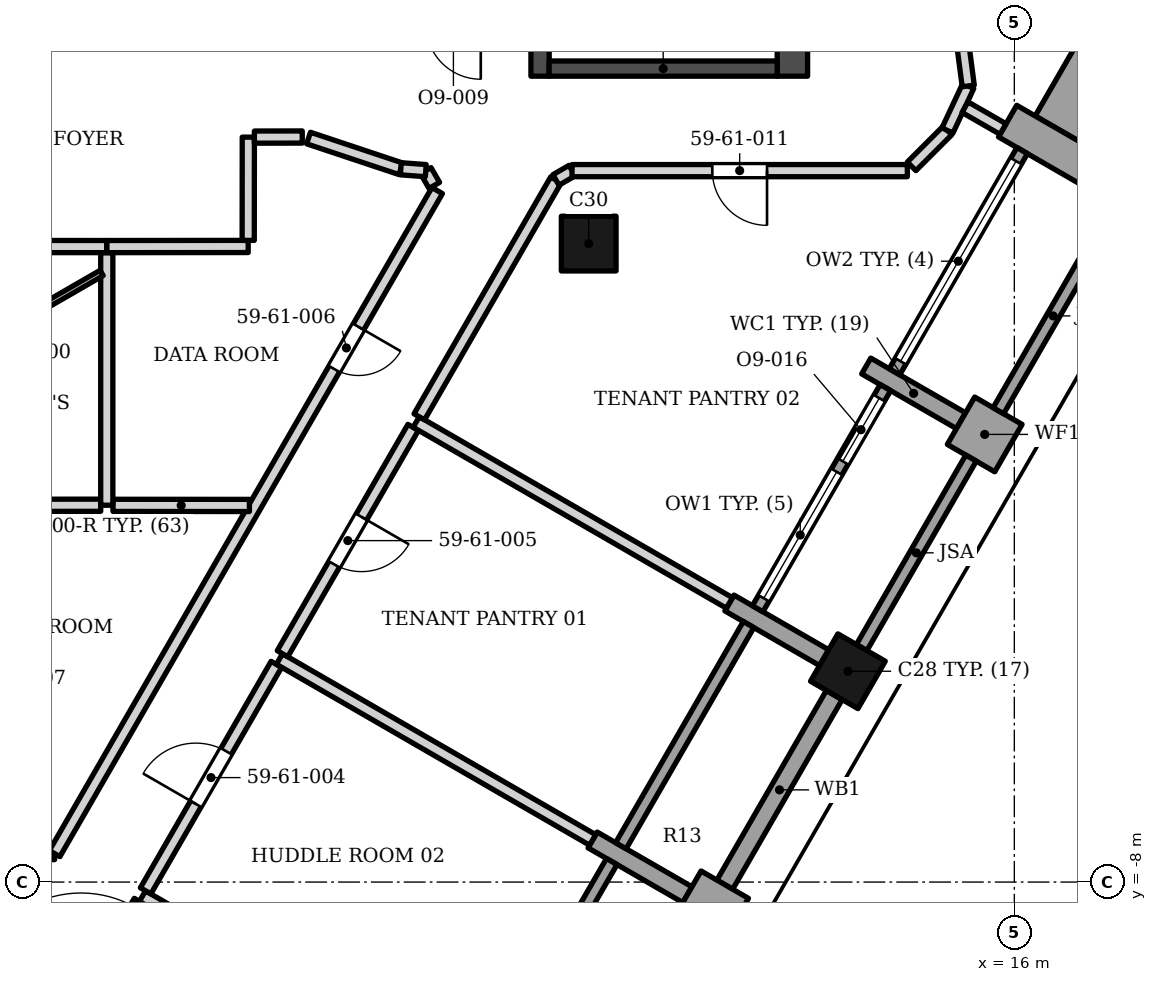
"""IFC4 building model, lengths in metres.
Left out: names, types, materials, properties, quantities, classifications, styles, units other than length and angle.
Written with IfcOpenShell. Run it as: python <this file> out.ifc"""

import sys

from ifc_helpers import new_model, si_unit, direction, frame, frame_2d, origin, origin_2d, place, context, subcontext, project, spatial, polyline, rectangle, outline, extrude, element, fill, save


model = new_model("IFC4")
c1 = context("Model", 3, precision=1e-05, world=origin(), true_north=direction((0.0, 1.0)))
c2 = subcontext(c1, "Body", "Model", "MODEL_VIEW")
j1 = project(units=[si_unit("LENGTHUNIT", "METRE"), si_unit("PLANEANGLEUNIT", "RADIAN")], contexts=[c1])
p1 = place(None, origin())
s1 = spatial("IfcSite", under=j1, at=p1, CompositionType="ELEMENT")
p2 = place(p1, origin())
s2 = spatial("IfcBuilding", under=s1, at=p2, CompositionType="ELEMENT")
p3 = place(p2, frame((0.0, 0.0, 248.2)))
s3 = spatial("IfcBuildingStorey", under=s2, at=p3, CompositionType="ELEMENT", Elevation=248.2)
p4 = place(p3, frame((12.35, 5.253, 0.0), z_axis=(0.0, 0.0, 1.0), x_axis=(0.0, 1.0, 0.0)))
e1 = element("IfcWall", 1, at=p4, inside=s3, PredefinedType="SHEAR", context=c2, shape_type="SweptSolid", body=[
    extrude(rectangle(XDim=13.8, YDim=0.5, at=frame_2d((6.9, 0.0))), origin(), (0.0, 0.0, 1.0), 3.9),
])
p5 = place(p3, frame((8.2, 5.253, 0.0), z_axis=(0.0, 0.0, 1.0), x_axis=(0.0, 1.0, 0.0)))
e2 = element("IfcWall", 2, at=p5, inside=s3, PredefinedType="SHEAR", context=c2, shape_type="SweptSolid", body=[
    extrude(rectangle(XDim=13.3, YDim=0.3, at=frame_2d((6.65, 0.0))), origin(), (0.0, 0.0, 1.0), 3.9),
])
p6 = place(p5, frame((7.1, 0.0, 0.0)))
e3 = element("IfcOpeningElement", 3, at=p6, cuts=e2, PredefinedType="OPENING", context=c2, shape_type="SweptSolid", body=[
    extrude(rectangle(XDim=1.4, YDim=2.1, at=frame_2d((0.7, 1.05))), frame((0.0, 0.16, 0.0), z_axis=(0.0, -1.0, 0.0), x_axis=(1.0, 0.0, 0.0)), (0.0, 0.0, 1.0), 0.32),
])
p7 = place(p5, frame((5.05, 0.0, 0.0)))
e4 = element("IfcOpeningElement", 4, at=p7, cuts=e2, PredefinedType="OPENING", context=c2, shape_type="SweptSolid", body=[
    extrude(rectangle(XDim=1.4, YDim=2.1, at=frame_2d((0.7, 1.05))), frame((0.0, 0.16, 0.0), z_axis=(0.0, -1.0, 0.0), x_axis=(1.0, 0.0, 0.0)), (0.0, 0.0, 1.0), 0.32),
])
p8 = place(p3, frame((8.35, 5.378, 0.0), z_axis=(0.0, 0.0, 1.0), x_axis=(1.0, 0.0, 0.0)))
e5 = element("IfcWall", 5, at=p8, inside=s3, PredefinedType="SHEAR", context=c2, shape_type="SweptSolid", body=[
    extrude(rectangle(XDim=3.75, YDim=0.25, at=frame_2d((1.875, 0.0))), origin(), (0.0, 0.0, 1.0), 3.9),
])
for number, where, z_axis, x_axis in (
    (6, (9.0, 2.5, 0.0), (0.0, 0.0, 1.0), (1.0, 0.0, 0.0)),
    (7, (13.263, -4.533, 0.0), (0.0, 0.0, 1.0), (0.5, 0.866, 0.0)),
):
    element("IfcColumn", number, at=place(p3, frame(where, z_axis=z_axis, x_axis=x_axis)), inside=s3, PredefinedType="COLUMN", context=c2, shape_type="SweptSolid", body=[
        extrude(rectangle(XDim=0.9, YDim=0.9, at=origin_2d()), origin(), (0.0, 0.0, 1.0), 3.9),
    ])
p9 = place(p3, frame((10.788, -8.822, 0.0), z_axis=(0.0, 0.0, 1.0), x_axis=(0.50001992892, 0.866013897511, 0.0)))
e8 = element("IfcWall", 8, at=p9, inside=s3, PredefinedType="SOLIDWALL", context=c2, shape_type="SweptSolid", body=[
    extrude(rectangle(XDim=0.9, YDim=0.9, at=frame_2d((0.45, 0.0))), origin(), (0.0, 0.0, 1.0), 3.0),
])
p10 = place(p3, frame((9.064, -7.307, 0.0), z_axis=(0.0, 0.0, 1.0), x_axis=(0.865989075817, -0.500062916607, 0.0)))
e9 = element("IfcWall", 9, at=p10, inside=s3, PredefinedType="SOLIDWALL", context=c2, shape_type="SweptSolid", body=[
    extrude(rectangle(XDim=1.8, YDim=0.3, at=frame_2d((0.9, 0.0))), origin(), (0.0, 0.0, 1.0), 3.0),
])
p11 = place(p3, frame((11.314, -3.41, 0.0), z_axis=(0.0, 0.0, 1.0), x_axis=(0.866029639064, -0.499992664208, 0.0)))
e10 = element("IfcWall", 10, at=p11, inside=s3, PredefinedType="SOLIDWALL", context=c2, shape_type="SweptSolid", body=[
    extrude(rectangle(XDim=1.799, YDim=0.3, at=frame_2d((0.899, 0.0))), origin(), (0.0, 0.0, 1.0), 3.0),
])
p12 = place(p3, frame((15.123, -0.413, 0.0), z_axis=(0.0, 0.0, 1.0), x_axis=(0.865964261186, -0.500105887137, 0.0)))
e11 = element("IfcWall", 11, at=p12, inside=s3, PredefinedType="SOLIDWALL", context=c2, shape_type="SweptSolid", body=[
    extrude(rectangle(XDim=0.9, YDim=0.9, at=frame_2d((0.45, 0.0))), origin(), (0.0, 0.0, 1.0), 3.0),
])
p13 = place(p3, frame((15.123, -0.413, 0.0), z_axis=(0.0, 0.0, 1.0), x_axis=(-0.866047807691, 0.499961193289, 0.0)))
e12 = element("IfcWall", 12, at=p13, inside=s3, PredefinedType="SOLIDWALL", context=c2, shape_type="SweptSolid", body=[
    extrude(rectangle(XDim=1.8, YDim=0.3, at=frame_2d((0.9, 0.0))), origin(), (0.0, 0.0, 1.0), 3.0),
])
p14 = place(p3, frame((17.448, 3.614, 0.0), z_axis=(0.0, 0.0, 1.0), x_axis=(-0.865989075817, 0.500062916607, 0.0)))
e13 = element("IfcWall", 13, at=p14, inside=s3, PredefinedType="SOLIDWALL", context=c2, shape_type="SweptSolid", body=[
    extrude(rectangle(XDim=1.8, YDim=0.6, at=frame_2d((0.9, 0.0))), origin(), (0.0, 0.0, 1.0), 2.95),
])
p15 = place(p3, frame((7.279, -11.3, 0.0), z_axis=(0.0, 0.0, 1.0), x_axis=(0.500027713859, 0.866009402589, 0.0)))
e14 = element("IfcWall", 14, at=p15, inside=s3, PredefinedType="ELEMENTEDWALL", context=c2, shape_type="SweptSolid", body=[
    extrude(rectangle(XDim=4.2, YDim=0.2, at=frame_2d((2.1, 0.0))), origin(), (0.0, 0.0, 1.0), 3.0),
])
p16 = place(p3, frame((11.238, -8.043, 0.0), z_axis=(0.0, 0.0, 1.0), x_axis=(0.500012057535, 0.866018442252, 0.0)))
e15 = element("IfcWall", 15, at=p16, inside=s3, PredefinedType="SOLIDWALL", context=c2, shape_type="SweptSolid", body=[
    extrude(rectangle(XDim=3.6, YDim=0.3, at=frame_2d((1.8, 0.0))), origin(), (0.0, 0.0, 1.0), 3.0),
])
p17 = place(p3, frame((9.529, -7.403, 0.0), z_axis=(0.0, 0.0, 1.0), x_axis=(0.500002543286, 0.866023935413, 0.0)))
e16 = element("IfcWall", 16, at=p17, inside=s3, PredefinedType="ELEMENTEDWALL", context=c2, shape_type="SweptSolid", body=[
    extrude(rectangle(XDim=4.2, YDim=0.2, at=frame_2d((2.1, 0.0))), origin(), (0.0, 0.0, 1.0), 3.0),
])
p18 = place(p3, origin())
e17 = element("IfcWall", 17, at=p18, inside=s3, PredefinedType="SOLIDWALL", context=c2, shape_type="SweptSolid", body=[
    extrude(outline(polyline([(15.201, -0.978), (13.402, -4.094), (13.576, -4.194), (15.375, -1.078), (15.201, -0.978)])), origin(), (0.0, 0.0, 1.0), 3.0),
])
p19 = place(p3, frame((11.779, -3.505, 0.0), z_axis=(0.0, 0.0, 1.0), x_axis=(0.500027713859, 0.866009402589, 0.0)))
e18 = element("IfcWall", 18, at=p19, inside=s3, PredefinedType="ELEMENTEDWALL", context=c2, shape_type="SweptSolid", body=[
    extrude(rectangle(XDim=4.2, YDim=0.2, at=frame_2d((2.1, 0.0))), origin(), (0.0, 0.0, 1.0), 3.0),
])
p20 = place(p19, frame((0.2, 0.0, 0.45)))
e19 = element("IfcOpeningElement", 19, at=p20, cuts=e18, PredefinedType="OPENING", context=c2, shape_type="SweptSolid", body=[
    extrude(rectangle(XDim=2.4, YDim=2.25, at=frame_2d((1.2, 1.125))), frame((0.0, 0.11, 0.0), z_axis=(0.0, -1.0, 0.0), x_axis=(1.0, 0.0, 0.0)), (0.0, 0.0, 1.0), 0.22),
])
p21 = place(p19, frame((2.8, 0.0, 0.0)))
e20 = element("IfcOpeningElement", 20, at=p21, cuts=e18, PredefinedType="OPENING", context=c2, shape_type="SweptSolid", body=[
    extrude(rectangle(XDim=1.2, YDim=2.7, at=frame_2d((0.6, 1.35))), frame((0.0, 0.11, 0.0), z_axis=(0.0, -1.0, 0.0), x_axis=(1.0, 0.0, 0.0)), (0.0, 0.0, 1.0), 0.22),
])
p22 = place(p3, frame((15.738, -0.249, 0.0), z_axis=(0.0, 0.0, 1.0), x_axis=(0.500012057535, 0.866018442252, 0.0)))
e21 = element("IfcWall", 21, at=p22, inside=s3, PredefinedType="SOLIDWALL", context=c2, shape_type="SweptSolid", body=[
    extrude(rectangle(XDim=3.6, YDim=0.2, at=frame_2d((1.8, 0.0))), origin(), (0.0, 0.0, 1.0), 3.0),
])
p23 = place(p3, frame((14.029, 0.392, 0.0), z_axis=(0.0, 0.0, 1.0), x_axis=(0.500027713859, 0.866009402589, 0.0)))
e22 = element("IfcWall", 22, at=p23, inside=s3, PredefinedType="ELEMENTEDWALL", context=c2, shape_type="SweptSolid", body=[
    extrude(rectangle(XDim=4.2, YDim=0.2, at=frame_2d((2.1, 0.0))), origin(), (0.0, 0.0, 1.0), 2.95),
])
p24 = place(p23, frame((0.2, 0.0, 0.45)))
e23 = element("IfcOpeningElement", 23, at=p24, cuts=e22, PredefinedType="OPENING", context=c2, shape_type="SweptSolid", body=[
    extrude(rectangle(XDim=3.8, YDim=2.25, at=frame_2d((1.9, 1.125))), frame((0.0, 0.11, 0.0), z_axis=(0.0, -1.0, 0.0), x_axis=(1.0, 0.0, 0.0)), (0.0, 0.0, 1.0), 0.22),
])
p25 = place(p3, origin())
e24 = element("IfcWall", 24, at=p25, inside=s3, PredefinedType="SOLIDWALL", context=c2, shape_type="SweptSolid", body=[
    extrude(outline(polyline([(18.378, 3.424), (18.378, 3.424), (18.378, 3.424), (20.271, 6.703), (18.236, 7.878), (16.343, 4.599), (17.598, 3.874), (17.598, 3.874), (18.378, 3.424)])), origin(), (0.0, 0.0, 1.0), 2.974),
])
p26 = place(p3, frame((0.598, -10.073, 0.0), z_axis=(0.0, 0.0, 1.0), x_axis=(0.500670744682, 0.865637802675, 0.0)))
e25 = element("IfcWall", 25, at=p26, inside=s3, PredefinedType="PARTITIONING", context=c2, shape_type="SweptSolid", body=[
    extrude(rectangle(XDim=2.028, YDim=0.2, at=frame_2d((1.014, 0.0))), origin(), (0.0, 0.0, 1.0), 3.73),
])
p27 = place(p26, frame((0.107, 0.0, 0.0)))
e26 = element("IfcOpeningElement", 26, at=p27, cuts=e25, PredefinedType="OPENING", context=c2, shape_type="SweptSolid", body=[
    extrude(rectangle(XDim=1.8, YDim=2.4, at=frame_2d((0.9, 1.2))), frame((0.0, 0.11, 0.0), z_axis=(0.0, -1.0, 0.0), x_axis=(1.0, 0.0, 0.0)), (0.0, 0.0, 1.0), 0.22),
])
p28 = place(p3, frame((1.661, -8.231, 0.0), z_axis=(0.0, 0.0, 1.0), x_axis=(0.866162357873, -0.499762713499, 0.0)))
e27 = element("IfcWall", 27, at=p28, inside=s3, PredefinedType="PARTITIONING", context=c2, shape_type="SweptSolid", body=[
    extrude(rectangle(XDim=5.95, YDim=0.2, at=frame_2d((2.975, 0.0))), origin(), (0.0, 0.0, 1.0), 2.884),
])
p29 = place(p3, frame((-0.161, -7.53, 0.0), z_axis=(0.0, 0.0, 1.0), x_axis=(0.999986611797, -0.005174574964, 0.0)))
e28 = element("IfcWall", 28, at=p29, inside=s3, PredefinedType="PARTITIONING", context=c2, shape_type="SweptSolid", body=[
    extrude(rectangle(XDim=0.377, YDim=0.2, at=frame_2d((0.189, 0.0))), origin(), (0.0, 0.0, 1.0), 3.73),
])
p30 = place(p3, frame((0.217, -7.532, 0.0), z_axis=(0.0, 0.0, 1.0), x_axis=(0.499766665369, 0.866160077691, 0.0)))
e29 = element("IfcWall", 29, at=p30, inside=s3, PredefinedType="PARTITIONING", context=c2, shape_type="SweptSolid", body=[
    extrude(rectangle(XDim=12.588, YDim=0.2, at=frame_2d((6.294, 0.0))), origin(), (0.0, 0.0, 1.0), 2.884),
])
p31 = place(p30, frame((9.201, 0.0, 0.0)))
e30 = element("IfcOpeningElement", 30, at=p31, cuts=e29, PredefinedType="OPENING", context=c2, shape_type="SweptSolid", body=[
    extrude(rectangle(XDim=0.8, YDim=2.1, at=frame_2d((0.4, 1.05))), frame((0.0, 0.11, 0.0), z_axis=(0.0, -1.0, 0.0), x_axis=(1.0, 0.0, 0.0)), (0.0, 0.0, 1.0), 0.22),
])
p32 = place(p3, frame((1.713, -8.144, 0.0), z_axis=(0.0, 0.0, 1.0), x_axis=(0.499986217557, 0.866033360935, 0.0)))
e31 = element("IfcWall", 31, at=p32, inside=s3, PredefinedType="PARTITIONING", context=c2, shape_type="SweptSolid", body=[
    extrude(rectangle(XDim=4.3, YDim=0.2, at=frame_2d((2.15, 0.0))), origin(), (0.0, 0.0, 1.0), 3.73),
])
p33 = place(p32, frame((1.65, 0.0, 0.0)))
e32 = element("IfcOpeningElement", 32, at=p33, cuts=e31, PredefinedType="OPENING", context=c2, shape_type="SweptSolid", body=[
    extrude(rectangle(XDim=1.0, YDim=2.1, at=frame_2d((0.5, 1.05))), frame((0.0, 0.11, 0.0), z_axis=(0.0, -1.0, 0.0), x_axis=(1.0, 0.0, 0.0)), (0.0, 0.0, 1.0), 0.22),
])
p34 = place(p3, frame((3.914, -4.332, 0.0), z_axis=(0.0, 0.0, 1.0), x_axis=(0.865897075154, -0.500222205864, 0.0)))
e33 = element("IfcWall", 33, at=p34, inside=s3, PredefinedType="PARTITIONING", context=c2, shape_type="SweptSolid", body=[
    extrude(rectangle(XDim=5.948, YDim=0.2, at=frame_2d((2.974, 0.0))), origin(), (0.0, 0.0, 1.0), 2.884),
])
p35 = place(p3, frame((1.176, -1.805, 0.0), z_axis=(0.0, 0.0, 1.0), x_axis=(0.999999709909, -0.000761697276, 0.0)))
e34 = element("IfcWall", 34, at=p35, inside=s3, PredefinedType="PARTITIONING", context=c2, shape_type="SweptSolid", body=[
    extrude(rectangle(XDim=2.244, YDim=0.2, at=frame_2d((1.122, 0.0))), origin(), (0.0, 0.0, 1.0), 3.73),
])
p36 = place(p3, frame((-1.227, -1.805, 0.0), z_axis=(0.0, 0.0, 1.0), x_axis=(0.999999698604, 0.000776397282, 0.0)))
e35 = element("IfcWall", 35, at=p36, inside=s3, PredefinedType="PARTITIONING", context=c2, shape_type="SweptSolid", body=[
    extrude(rectangle(XDim=2.201, YDim=0.2, at=frame_2d((1.101, 0.0))), origin(), (0.0, 0.0, 1.0), 3.73),
])
p37 = place(p3, frame((1.074, -1.803, 0.0), z_axis=(0.0, 0.0, 1.0), x_axis=(0.0, 1.0, 0.0)))
e36 = element("IfcWall", 36, at=p37, inside=s3, PredefinedType="PARTITIONING", context=c2, shape_type="SweptSolid", body=[
    extrude(rectangle(XDim=4.154, YDim=0.2, at=frame_2d((2.077, 0.0))), origin(), (0.0, 0.0, 1.0), 3.73),
])
p38 = place(p3, frame((3.964, -4.245, 0.0), z_axis=(0.0, 0.0, 1.0), x_axis=(0.499987977232, 0.866032345022, 0.0)))
e37 = element("IfcWall", 37, at=p38, inside=s3, PredefinedType="PARTITIONING", context=c2, shape_type="SweptSolid", body=[
    extrude(rectangle(XDim=4.298, YDim=0.2, at=frame_2d((2.149, 0.0))), origin(), (0.0, 0.0, 1.0), 2.884),
])
p39 = place(p38, frame((1.698, 0.0, 0.0)))
e38 = element("IfcOpeningElement", 38, at=p39, cuts=e37, PredefinedType="OPENING", context=c2, shape_type="SweptSolid", body=[
    extrude(rectangle(XDim=0.9, YDim=2.1, at=frame_2d((0.45, 1.05))), frame((0.0, 0.11, 0.0), z_axis=(0.0, -1.0, 0.0), x_axis=(1.0, 0.0, 0.0)), (0.0, 0.0, 1.0), 0.22),
])
p40 = place(p3, frame((6.163, -0.434, 0.0), z_axis=(0.0, 0.0, 1.0), x_axis=(0.865895092647, -0.500225637618, 0.0)))
e39 = element("IfcWall", 39, at=p40, inside=s3, PredefinedType="PARTITIONING", context=c2, shape_type="SweptSolid", body=[
    extrude(rectangle(XDim=5.949, YDim=0.2, at=frame_2d((2.975, 0.0))), origin(), (0.0, 0.0, 1.0), 3.052),
])
p41 = place(p3, frame((-2.32, 0.106, 0.0), z_axis=(0.0, 0.0, 1.0), x_axis=(0.866013238859, 0.500021069677, 0.0)))
e40 = element("IfcWall", 40, at=p41, inside=s3, PredefinedType="PARTITIONING", context=c2, shape_type="SweptSolid", body=[
    extrude(rectangle(XDim=3.822, YDim=0.1, at=frame_2d((1.911, 0.0))), origin(), (0.0, 0.0, 1.0), 2.884),
])
p42 = place(p3, frame((-3.4, 2.452, 0.0), z_axis=(0.0, 0.0, 1.0), x_axis=(0.999999927065, -0.000381929261, 0.0)))
e41 = element("IfcWall", 41, at=p42, inside=s3, PredefinedType="PARTITIONING", context=c2, shape_type="SweptSolid", body=[
    extrude(rectangle(XDim=4.475, YDim=0.2, at=frame_2d((2.237, 0.0))), origin(), (0.0, 0.0, 1.0), 3.73),
])
p43 = place(p3, frame((1.076, 2.451, 0.0), z_axis=(0.0, 0.0, 1.0), x_axis=(0.999999729558, 0.000735448425, 0.0)))
e42 = element("IfcWall", 42, at=p43, inside=s3, PredefinedType="PARTITIONING", context=c2, shape_type="SweptSolid", body=[
    extrude(rectangle(XDim=2.324, YDim=0.2, at=frame_2d((1.162, 0.0))), origin(), (0.0, 0.0, 1.0), 3.73),
])
p44 = place(p3, frame((6.32, 3.7, 0.0), z_axis=(0.0, 0.0, 1.0), x_axis=(0.499973348067, -0.866040790738, 0.0)))
e43 = element("IfcWall", 43, at=p44, inside=s3, PredefinedType="PARTITIONING", context=c2, shape_type="SweptSolid", body=[
    extrude(rectangle(XDim=0.281, YDim=0.2, at=frame_2d((0.14, 0.0))), origin(), (0.0, 0.0, 1.0), 3.73),
])
p45 = place(p3, frame((6.214, -0.349, 0.0), z_axis=(0.0, 0.0, 1.0), x_axis=(0.499747517155, 0.866171125758, 0.0)))
e44 = element("IfcWall", 44, at=p45, inside=s3, PredefinedType="PARTITIONING", context=c2, shape_type="SweptSolid", body=[
    extrude(rectangle(XDim=4.497, YDim=0.2, at=frame_2d((2.249, 0.0))), origin(), (0.0, 0.0, 1.0), 3.73),
])
p46 = place(p3, frame((8.461, 3.546, 0.0), z_axis=(0.0, 0.0, 1.0), x_axis=(0.865826662844, 0.500344071524, 0.0)))
e45 = element("IfcWall", 45, at=p46, inside=s3, PredefinedType="PARTITIONING", context=c2, shape_type="SweptSolid", body=[
    extrude(rectangle(XDim=0.306, YDim=0.2, at=frame_2d((0.153, 0.0))), origin(), (0.0, 0.0, 1.0), 3.73),
])
p47 = place(p3, frame((8.726, 3.699, 0.0), z_axis=(0.0, 0.0, 1.0), x_axis=(1.0, 0.0, 0.0)))
e46 = element("IfcWall", 46, at=p47, inside=s3, PredefinedType="PARTITIONING", context=c2, shape_type="SweptSolid", body=[
    extrude(rectangle(XDim=5.514, YDim=0.2, at=frame_2d((2.757, 0.0))), origin(), (0.0, 0.0, 1.0), 3.282),
])
p48 = place(p47, frame((2.307, 0.0, 0.0)))
e47 = element("IfcOpeningElement", 47, at=p48, cuts=e46, PredefinedType="OPENING", context=c2, shape_type="SweptSolid", body=[
    extrude(rectangle(XDim=0.9, YDim=2.1, at=frame_2d((0.45, 1.05))), frame((0.0, 0.11, 0.0), z_axis=(0.0, -1.0, 0.0), x_axis=(1.0, 0.0, 0.0)), (0.0, 0.0, 1.0), 0.22),
])
p49 = place(p3, frame((4.393, 4.236, 0.0), z_axis=(0.0, 0.0, 1.0), x_axis=(0.948729076189, -0.316090398453, 0.0)))
e48 = element("IfcWall", 48, at=p49, inside=s3, PredefinedType="PARTITIONING", context=c2, shape_type="SweptSolid", body=[
    extrude(rectangle(XDim=1.6, YDim=0.2, at=frame_2d((0.8, 0.0))), origin(), (0.0, 0.0, 1.0), 2.884),
])
p50 = place(p3, frame((5.91, 3.73, 0.0), z_axis=(0.0, 0.0, 1.0), x_axis=(0.997287156444, -0.073609290118, 0.0)))
e49 = element("IfcWall", 49, at=p50, inside=s3, PredefinedType="PARTITIONING", context=c2, shape_type="SweptSolid", body=[
    extrude(rectangle(XDim=0.411, YDim=0.2, at=frame_2d((0.206, 0.0))), origin(), (0.0, 0.0, 1.0), 3.73),
])
p51 = place(p3, frame((3.4, 2.552, 0.0), z_axis=(0.0, 0.0, 1.0), x_axis=(0.001150250857, 0.999999338461, 0.0)))
e50 = element("IfcWall", 50, at=p51, inside=s3, PredefinedType="PARTITIONING", context=c2, shape_type="SweptSolid", body=[
    extrude(rectangle(XDim=1.698, YDim=0.2, at=frame_2d((0.849, 0.0))), origin(), (0.0, 0.0, 1.0), 3.73),
])
p52 = place(p3, frame((3.502, 4.251, 0.0), z_axis=(0.0, 0.0, 1.0), x_axis=(0.999997642919, 0.002171210763, 0.0)))
e51 = element("IfcWall", 51, at=p52, inside=s3, PredefinedType="PARTITIONING", context=c2, shape_type="SweptSolid", body=[
    extrude(rectangle(XDim=0.787, YDim=0.2, at=frame_2d((0.394, 0.0))), origin(), (0.0, 0.0, 1.0), 3.73),
])
p53 = place(p3, frame((14.311, 3.77, 0.0), z_axis=(0.0, 0.0, 1.0), x_axis=(0.707253195258, 0.706960336792, 0.0)))
e52 = element("IfcWall", 52, at=p53, inside=s3, PredefinedType="PARTITIONING", context=c2, shape_type="SweptSolid", body=[
    extrude(rectangle(XDim=0.834, YDim=0.2, at=frame_2d((0.417, 0.0))), origin(), (0.0, 0.0, 1.0), 3.73),
])
p54 = place(p3, frame((14.9, 4.36, 0.0), z_axis=(0.0, 0.0, 1.0), x_axis=(0.423133460634, 0.906067367524, 0.0)))
e53 = element("IfcWall", 53, at=p54, inside=s3, PredefinedType="PARTITIONING", context=c2, shape_type="SweptSolid", body=[
    extrude(rectangle(XDim=0.808, YDim=0.2, at=frame_2d((0.404, 0.0))), origin(), (0.0, 0.0, 1.0), 2.95),
])
p55 = place(p3, frame((15.19, 4.743, 0.0), z_axis=(0.0, 0.0, 1.0), x_axis=(0.867114884312, -0.498108198491, 0.0)))
e54 = element("IfcWall", 54, at=p55, inside=s3, PredefinedType="PARTITIONING", context=c2, shape_type="SweptSolid", body=[
    extrude(rectangle(XDim=0.72, YDim=0.2, at=frame_2d((0.36, 0.0))), origin(), (0.0, 0.0, 1.0), 2.95),
])
p56 = place(p3, frame((15.137, 5.889, 0.0), z_axis=(0.0, 0.0, 1.0), x_axis=(0.130572336197, -0.991438785312, 0.0)))
e55 = element("IfcWall", 55, at=p56, inside=s3, PredefinedType="PARTITIONING", context=c2, shape_type="SweptSolid", body=[
    extrude(rectangle(XDim=0.804, YDim=0.2, at=frame_2d((0.402, 0.0))), origin(), (0.0, 0.0, 1.0), 3.73),
])
p57 = place(p20, origin())
e56 = element("IfcWindow", 56, at=p57, inside=s3, PartitioningType="SINGLE_PANEL", PredefinedType="WINDOW", context=c2, shape_type="SweptSolid", body=[
    extrude(rectangle(XDim=2.4, YDim=2.25, at=frame_2d((1.2, 1.125))), frame((0.0, 0.03, 0.0), z_axis=(0.0, -1.0, 0.0), x_axis=(1.0, 0.0, 0.0)), (0.0, 0.0, 1.0), 0.06),
])
fill(e19, e56)
p58 = place(p21, origin())
e57 = element("IfcDoor", 57, at=p58, inside=s3, OperationType="SINGLE_SWING_LEFT", PredefinedType="DOOR", context=c2, shape_type="SweptSolid", body=[
    extrude(rectangle(XDim=1.2, YDim=2.7, at=frame_2d((0.6, 1.35))), frame((0.0, 0.025, 0.0), z_axis=(0.0, -1.0, 0.0), x_axis=(1.0, 0.0, 0.0)), (0.0, 0.0, 1.0), 0.05),
])
fill(e20, e57)
p59 = place(p24, origin())
e58 = element("IfcWindow", 58, at=p59, inside=s3, PartitioningType="SINGLE_PANEL", PredefinedType="WINDOW", context=c2, shape_type="SweptSolid", body=[
    extrude(rectangle(XDim=3.8, YDim=2.25, at=frame_2d((1.9, 1.125))), frame((0.0, 0.03, 0.0), z_axis=(0.0, -1.0, 0.0), x_axis=(1.0, 0.0, 0.0)), (0.0, 0.0, 1.0), 0.06),
])
fill(e23, e58)
p60 = place(p33, origin())
e59 = element("IfcDoor", 59, at=p60, inside=s3, OperationType="SINGLE_SWING_LEFT", PredefinedType="DOOR", context=c2, shape_type="SweptSolid", body=[
    extrude(rectangle(XDim=1.0, YDim=2.1, at=frame_2d((0.5, 1.05))), frame((0.0, 0.025, 0.0), z_axis=(0.0, -1.0, 0.0), x_axis=(1.0, 0.0, 0.0)), (0.0, 0.0, 1.0), 0.05),
])
fill(e32, e59)
p61 = place(p39, origin())
e60 = element("IfcDoor", 60, at=p61, inside=s3, OperationType="SINGLE_SWING_RIGHT", PredefinedType="DOOR", context=c2, shape_type="SweptSolid", body=[
    extrude(rectangle(XDim=0.9, YDim=2.1, at=frame_2d((0.45, 1.05))), frame((0.0, 0.025, 0.0), z_axis=(0.0, -1.0, 0.0), x_axis=(1.0, 0.0, 0.0)), (0.0, 0.0, 1.0), 0.05),
])
fill(e38, e60)
p62 = place(p31, origin())
e61 = element("IfcDoor", 61, at=p62, inside=s3, OperationType="SINGLE_SWING_RIGHT", PredefinedType="DOOR", context=c2, shape_type="SweptSolid", body=[
    extrude(rectangle(XDim=0.8, YDim=2.1, at=frame_2d((0.4, 1.05))), frame((0.0, 0.025, 0.0), z_axis=(0.0, -1.0, 0.0), x_axis=(1.0, 0.0, 0.0)), (0.0, 0.0, 1.0), 0.05),
])
fill(e30, e61)
p63 = place(p48, origin())
e62 = element("IfcDoor", 62, at=p63, inside=s3, OperationType="SINGLE_SWING_RIGHT", PredefinedType="DOOR", context=c2, shape_type="SweptSolid", body=[
    extrude(rectangle(XDim=0.9, YDim=2.1, at=frame_2d((0.45, 1.05))), frame((0.0, 0.025, 0.0), z_axis=(0.0, -1.0, 0.0), x_axis=(1.0, 0.0, 0.0)), (0.0, 0.0, 1.0), 0.05),
])
fill(e47, e62)
save(model, sys.argv[1])
